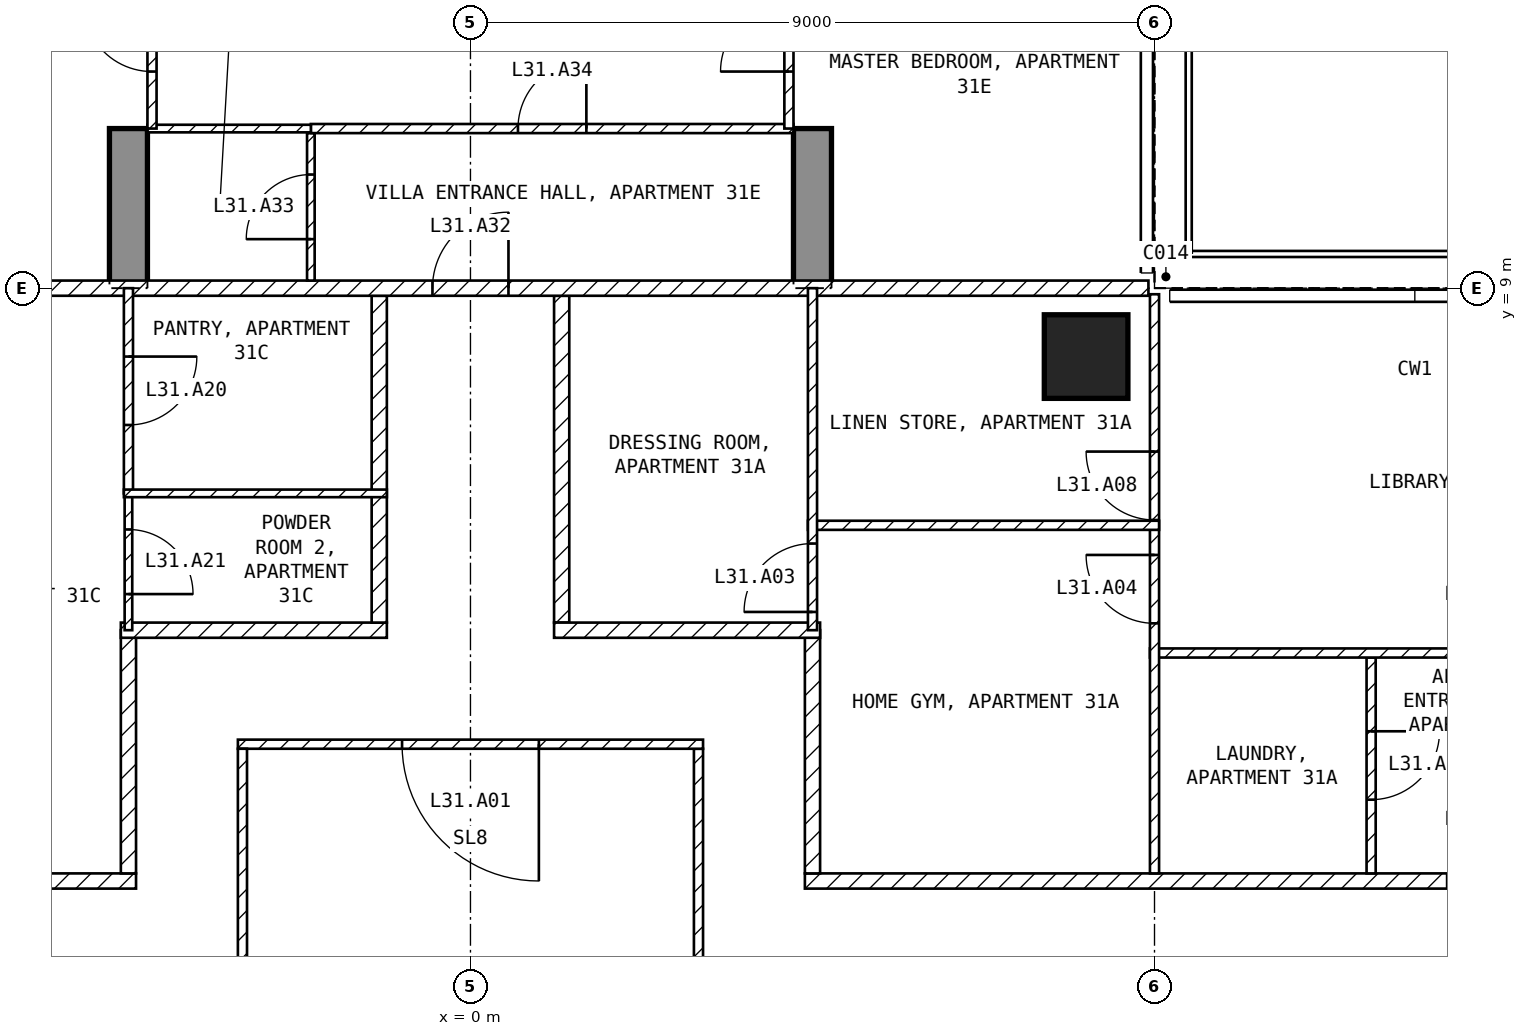
"""IFC4 building model, lengths in metres.
Left out: names, types, materials, properties, quantities, classifications, styles, units other than length and angle.
Written with IfcOpenShell. Run it as: python <this file> out.ifc"""

import sys

from ifc_helpers import new_model, si_unit, direction, frame, frame_2d, origin, origin_2d, place, context, subcontext, project, spatial, polyline, rectangle, outline, extrude, element, fill, save


model = new_model("IFC4")
c1 = context("Model", 3, precision=1e-05, world=origin(), true_north=direction((0.0, 1.0)))
c2 = subcontext(c1, "Body", "Model", "MODEL_VIEW")
j1 = project(units=[si_unit("LENGTHUNIT", "METRE"), si_unit("PLANEANGLEUNIT", "RADIAN")], contexts=[c1])
p1 = place(None, origin())
s1 = spatial("IfcSite", under=j1, at=p1, CompositionType="ELEMENT")
p2 = place(p1, origin())
s2 = spatial("IfcBuilding", under=s1, at=p2, CompositionType="ELEMENT")
p3 = place(p2, frame((0.0, 0.0, 130.4)))
s3 = spatial("IfcBuildingStorey", under=s2, at=p3, CompositionType="ELEMENT", Elevation=130.4)
p4 = place(p3, frame((8.1, 8.1, -0.25), z_axis=(0.0, 0.0, 1.0), x_axis=(1.0, 0.0, 0.0)))
e1 = element("IfcColumn", 1, at=p4, inside=s3, PredefinedType="COLUMN", context=c2, shape_type="SweptSolid", body=[
    extrude(rectangle(XDim=1.1, YDim=1.1, at=origin_2d()), origin(), (0.0, 0.0, 1.0), 3.5),
])
for number, where, z_axis, x_axis in (
    (2, (-4.75, 9.0, -0.25), (1.0, 0.0, 0.0), (0.0, 1.0, 0.0)),
    (3, (4.25, 9.0, -0.25), (1.0, 0.0, 0.0), (0.0, 1.0, 0.0)),
):
    element("IfcWall", number, at=place(p3, frame(where, z_axis=z_axis, x_axis=x_axis)), inside=s3, PredefinedType="SHEAR", context=c2, shape_type="SweptSolid", body=[
        extrude(outline(polyline([(0.0, 0.0), (2.1, 0.0), (2.1, 2.65), (4.5, 2.65), (4.5, 0.0), (9.9, 0.0), (9.9, 2.65), (12.3, 2.65), (12.3, 0.0), (16.55, 0.0), (16.55, 3.5), (0.0, 3.5), (0.0, 0.0)])), origin(), (0.0, 0.0, 1.0), 0.5),
    ])
p5 = place(p3, frame((3.0, -2.94, 0.0), z_axis=(0.0, 0.0, 1.0), x_axis=(0.0, 1.0, 0.0)))
e4 = element("IfcWall", 4, at=p5, inside=s3, PredefinedType="PARTITIONING", context=c2, shape_type="SweptSolid", body=[
    extrude(rectangle(XDim=5.88, YDim=0.12, at=frame_2d((2.94, 0.0))), origin(), (0.0, 0.0, 1.0), 3.25),
])
p6 = place(p3, frame((3.06, 3.0, 0.0), z_axis=(0.0, 0.0, 1.0), x_axis=(-1.0, 0.0, 0.0)))
e5 = element("IfcWall", 5, at=p6, inside=s3, PredefinedType="PARTITIONING", context=c2, shape_type="SweptSolid", body=[
    extrude(rectangle(XDim=6.12, YDim=0.12, at=frame_2d((3.06, 0.0))), origin(), (0.0, 0.0, 1.0), 3.25),
])
p7 = place(p6, frame((2.16, 0.0, 0.0)))
e6 = element("IfcOpeningElement", 6, at=p7, cuts=e5, PredefinedType="OPENING", context=c2, shape_type="SweptSolid", body=[
    extrude(rectangle(XDim=1.8, YDim=2.1, at=frame_2d((0.9, 1.05))), frame((0.0, 0.07, 0.0), z_axis=(0.0, -1.0, 0.0), x_axis=(1.0, 0.0, 0.0)), (0.0, 0.0, 1.0), 0.14),
])
p8 = place(p3, frame((-3.0, 2.94, 0.0), z_axis=(0.0, 0.0, 1.0), x_axis=(0.0, -1.0, 0.0)))
e7 = element("IfcWall", 7, at=p8, inside=s3, PredefinedType="PARTITIONING", context=c2, shape_type="SweptSolid", body=[
    extrude(rectangle(XDim=5.88, YDim=0.12, at=frame_2d((2.94, 0.0))), origin(), (0.0, 0.0, 1.0), 3.25),
])
p9 = place(p3, frame((4.4, 1.2, 0.0), z_axis=(0.0, 0.0, 1.0), x_axis=(1.0, 0.0, 0.0)))
e8 = element("IfcWall", 8, at=p9, inside=s3, PredefinedType="PARTITIONING", context=c2, shape_type="SweptSolid", body=[
    extrude(rectangle(XDim=17.2, YDim=0.2, at=frame_2d((8.6, 0.0))), origin(), (0.0, 0.0, 1.0), 3.25),
])
p10 = place(p9, frame((8.45, 0.0, 0.0)))
e9 = element("IfcOpeningElement", 9, at=p10, cuts=e8, PredefinedType="OPENING", context=c2, shape_type="SweptSolid", body=[
    extrude(rectangle(XDim=1.0, YDim=2.1, at=frame_2d((0.5, 1.05))), frame((0.0, 0.11, 0.0), z_axis=(0.0, -1.0, 0.0), x_axis=(1.0, 0.0, 0.0)), (0.0, 0.0, 1.0), 0.22),
])
p11 = place(p3, frame((4.5, 4.5, 0.0), z_axis=(0.0, 0.0, 1.0), x_axis=(0.0, -1.0, 0.0)))
e10 = element("IfcWall", 10, at=p11, inside=s3, PredefinedType="PARTITIONING", context=c2, shape_type="SweptSolid", body=[
    extrude(rectangle(XDim=3.2, YDim=0.2, at=frame_2d((1.6, 0.0))), origin(), (0.0, 0.0, 1.0), 3.25),
])
p12 = place(p3, frame((1.2, 8.9, 0.0), z_axis=(0.0, 0.0, 1.0), x_axis=(0.0, -1.0, 0.0)))
e11 = element("IfcWall", 11, at=p12, inside=s3, PredefinedType="PARTITIONING", context=c2, shape_type="SweptSolid", body=[
    extrude(rectangle(XDim=4.3, YDim=0.2, at=frame_2d((2.15, 0.0))), origin(), (0.0, 0.0, 1.0), 3.25),
])
p13 = place(p3, frame((1.1, 4.5, 0.0), z_axis=(0.0, 0.0, 1.0), x_axis=(1.0, 0.0, 0.0)))
e12 = element("IfcWall", 12, at=p13, inside=s3, PredefinedType="PARTITIONING", context=c2, shape_type="SweptSolid", body=[
    extrude(rectangle(XDim=3.5, YDim=0.2, at=frame_2d((1.75, 0.0))), origin(), (0.0, 0.0, 1.0), 3.25),
])
p14 = place(p3, frame((-21.6, 1.2, 0.0), z_axis=(0.0, 0.0, 1.0), x_axis=(1.0, 0.0, 0.0)))
e13 = element("IfcWall", 13, at=p14, inside=s3, PredefinedType="PARTITIONING", context=c2, shape_type="SweptSolid", body=[
    extrude(rectangle(XDim=17.2, YDim=0.2, at=frame_2d((8.6, 0.0))), origin(), (0.0, 0.0, 1.0), 3.25),
])
p15 = place(p14, frame((10.9, 0.0, 0.0)))
e14 = element("IfcOpeningElement", 14, at=p15, cuts=e13, PredefinedType="OPENING", context=c2, shape_type="SweptSolid", body=[
    extrude(rectangle(XDim=1.0, YDim=2.1, at=frame_2d((0.5, 1.05))), frame((0.0, 0.11, 0.0), z_axis=(0.0, -1.0, 0.0), x_axis=(1.0, 0.0, 0.0)), (0.0, 0.0, 1.0), 0.22),
])
p16 = place(p3, frame((-4.5, 1.3, 0.0), z_axis=(0.0, 0.0, 1.0), x_axis=(0.0, 1.0, 0.0)))
e15 = element("IfcWall", 15, at=p16, inside=s3, PredefinedType="PARTITIONING", context=c2, shape_type="SweptSolid", body=[
    extrude(rectangle(XDim=3.2, YDim=0.2, at=frame_2d((1.6, 0.0))), origin(), (0.0, 0.0, 1.0), 3.25),
])
p17 = place(p3, frame((-4.6, 4.5, 0.0), z_axis=(0.0, 0.0, 1.0), x_axis=(1.0, 0.0, 0.0)))
e16 = element("IfcWall", 16, at=p17, inside=s3, PredefinedType="PARTITIONING", context=c2, shape_type="SweptSolid", body=[
    extrude(rectangle(XDim=3.5, YDim=0.2, at=frame_2d((1.75, 0.0))), origin(), (0.0, 0.0, 1.0), 3.25),
])
p18 = place(p3, frame((-1.2, 4.6, 0.0), z_axis=(0.0, 0.0, 1.0), x_axis=(0.0, 1.0, 0.0)))
e17 = element("IfcWall", 17, at=p18, inside=s3, PredefinedType="PARTITIONING", context=c2, shape_type="SweptSolid", body=[
    extrude(rectangle(XDim=4.3, YDim=0.2, at=frame_2d((2.15, 0.0))), origin(), (0.0, 0.0, 1.0), 3.25),
])
p19 = place(p3, frame((-8.92, 9.0, 0.0), z_axis=(0.0, 0.0, 1.0), x_axis=(1.0, 0.0, 0.0)))
e18 = element("IfcWall", 18, at=p19, inside=s3, PredefinedType="PARTITIONING", context=c2, shape_type="SweptSolid", body=[
    extrude(rectangle(XDim=17.84, YDim=0.2, at=frame_2d((8.92, 0.0))), origin(), (0.0, 0.0, 1.0), 3.25),
])
p20 = place(p19, frame((8.42, 0.0, 0.0)))
e19 = element("IfcOpeningElement", 19, at=p20, cuts=e18, PredefinedType="OPENING", context=c2, shape_type="SweptSolid", body=[
    extrude(rectangle(XDim=1.0, YDim=2.1, at=frame_2d((0.5, 1.05))), frame((0.0, 0.11, 0.0), z_axis=(0.0, -1.0, 0.0), x_axis=(1.0, 0.0, 0.0)), (0.0, 0.0, 1.0), 0.22),
])
p21 = place(p3, frame((11.85, 4.14, 0.0), z_axis=(0.0, 0.0, 1.0), x_axis=(0.0, -1.0, 0.0)))
e20 = element("IfcWall", 20, at=p21, inside=s3, PredefinedType="PARTITIONING", context=c2, shape_type="SweptSolid", body=[
    extrude(rectangle(XDim=2.84, YDim=0.12, at=frame_2d((1.42, 0.0))), origin(), (0.0, 0.0, 1.0), 3.25),
])
p22 = place(p21, frame((0.97, 0.0, 0.0)))
e21 = element("IfcOpeningElement", 21, at=p22, cuts=e20, PredefinedType="OPENING", context=c2, shape_type="SweptSolid", body=[
    extrude(rectangle(XDim=0.9, YDim=2.1, at=frame_2d((0.45, 1.05))), frame((0.0, 0.07, 0.0), z_axis=(0.0, -1.0, 0.0), x_axis=(1.0, 0.0, 0.0)), (0.0, 0.0, 1.0), 0.14),
])
p23 = place(p3, frame((8.94, 4.2, 0.0), z_axis=(0.0, 0.0, 1.0), x_axis=(1.0, 0.0, 0.0)))
e22 = element("IfcWall", 22, at=p23, inside=s3, PredefinedType="PARTITIONING", context=c2, shape_type="SweptSolid", body=[
    extrude(rectangle(XDim=10.71, YDim=0.12, at=frame_2d((5.355, 0.0))), origin(), (0.0, 0.0, 1.0), 3.25),
])
p24 = place(p23, frame((3.96, 0.0, 0.0)))
e23 = element("IfcOpeningElement", 23, at=p24, cuts=e22, PredefinedType="OPENING", context=c2, shape_type="SweptSolid", body=[
    extrude(rectangle(XDim=0.9, YDim=2.1, at=frame_2d((0.45, 1.05))), frame((0.0, 0.07, 0.0), z_axis=(0.0, -1.0, 0.0), x_axis=(1.0, 0.0, 0.0)), (0.0, 0.0, 1.0), 0.14),
])
p25 = place(p3, frame((9.0, 1.3, 0.0), z_axis=(0.0, 0.0, 1.0), x_axis=(0.0, 1.0, 0.0)))
e24 = element("IfcWall", 24, at=p25, inside=s3, PredefinedType="PARTITIONING", context=c2, shape_type="SweptSolid", body=[
    extrude(rectangle(XDim=7.62, YDim=0.12, at=frame_2d((3.81, 0.0))), origin(), (0.0, 0.0, 1.0), 3.25),
])
p26 = place(p25, frame((3.29, 0.0, 0.0)))
e25 = element("IfcOpeningElement", 25, at=p26, cuts=e24, PredefinedType="OPENING", context=c2, shape_type="SweptSolid", body=[
    extrude(rectangle(XDim=0.9, YDim=2.1, at=frame_2d((0.45, 1.05))), frame((0.0, 0.07, 0.0), z_axis=(0.0, -1.0, 0.0), x_axis=(1.0, 0.0, 0.0)), (0.0, 0.0, 1.0), 0.14),
])
p27 = place(p25, frame((4.65, 0.0, 0.0)))
e26 = element("IfcOpeningElement", 26, at=p27, cuts=e24, PredefinedType="OPENING", context=c2, shape_type="SweptSolid", body=[
    extrude(rectangle(XDim=0.9, YDim=2.1, at=frame_2d((0.45, 1.05))), frame((0.0, 0.07, 0.0), z_axis=(0.0, -1.0, 0.0), x_axis=(1.0, 0.0, 0.0)), (0.0, 0.0, 1.0), 0.14),
])
p28 = place(p3, frame((4.44, 5.88, 0.0), z_axis=(0.0, 0.0, 1.0), x_axis=(1.0, 0.0, 0.0)))
e27 = element("IfcWall", 27, at=p28, inside=s3, PredefinedType="PARTITIONING", context=c2, shape_type="SweptSolid", body=[
    extrude(rectangle(XDim=4.62, YDim=0.12, at=frame_2d((2.31, 0.0))), origin(), (0.0, 0.0, 1.0), 3.25),
])
p29 = place(p3, frame((4.5, 4.5, 0.0), z_axis=(0.0, 0.0, 1.0), x_axis=(0.0, 1.0, 0.0)))
e28 = element("IfcWall", 28, at=p29, inside=s3, PredefinedType="PARTITIONING", context=c2, shape_type="SweptSolid", body=[
    extrude(rectangle(XDim=4.5, YDim=0.12, at=frame_2d((2.25, 0.0))), origin(), (0.0, 0.0, 1.0), 3.25),
])
p30 = place(p29, frame((0.24, 0.0, 0.0)))
e29 = element("IfcOpeningElement", 29, at=p30, cuts=e28, PredefinedType="OPENING", context=c2, shape_type="SweptSolid", body=[
    extrude(rectangle(XDim=0.9, YDim=2.1, at=frame_2d((0.45, 1.05))), frame((0.0, 0.07, 0.0), z_axis=(0.0, -1.0, 0.0), x_axis=(1.0, 0.0, 0.0)), (0.0, 0.0, 1.0), 0.14),
])
p31 = place(p3, frame((-4.5, 6.3, 0.0), z_axis=(0.0, 0.0, 1.0), x_axis=(0.0, -1.0, 0.0)))
e30 = element("IfcWall", 30, at=p31, inside=s3, PredefinedType="PARTITIONING", context=c2, shape_type="SweptSolid", body=[
    extrude(rectangle(XDim=1.8, YDim=0.1, at=frame_2d((0.9, 0.0))), origin(), (0.0, 0.0, 1.0), 3.25),
])
p32 = place(p31, frame((0.475, 0.0, 0.0)))
e31 = element("IfcOpeningElement", 31, at=p32, cuts=e30, PredefinedType="OPENING", context=c2, shape_type="SweptSolid", body=[
    extrude(rectangle(XDim=0.85, YDim=2.1, at=frame_2d((0.425, 1.05))), frame((0.0, 0.06, 0.0), z_axis=(0.0, -1.0, 0.0), x_axis=(1.0, 0.0, 0.0)), (0.0, 0.0, 1.0), 0.12),
])
p33 = place(p3, frame((-4.5, 9.0, 0.0), z_axis=(0.0, 0.0, 1.0), x_axis=(0.0, -1.0, 0.0)))
e32 = element("IfcWall", 32, at=p33, inside=s3, PredefinedType="PARTITIONING", context=c2, shape_type="SweptSolid", body=[
    extrude(rectangle(XDim=2.7, YDim=0.12, at=frame_2d((1.35, 0.0))), origin(), (0.0, 0.0, 1.0), 3.25),
])
p34 = place(p33, frame((0.9, 0.0, 0.0)))
e33 = element("IfcOpeningElement", 33, at=p34, cuts=e32, PredefinedType="OPENING", context=c2, shape_type="SweptSolid", body=[
    extrude(rectangle(XDim=0.9, YDim=2.1, at=frame_2d((0.45, 1.05))), frame((0.0, 0.07, 0.0), z_axis=(0.0, -1.0, 0.0), x_axis=(1.0, 0.0, 0.0)), (0.0, 0.0, 1.0), 0.14),
])
p35 = place(p3, frame((-4.56, 6.3, 0.0), z_axis=(0.0, 0.0, 1.0), x_axis=(1.0, 0.0, 0.0)))
e34 = element("IfcWall", 34, at=p35, inside=s3, PredefinedType="PARTITIONING", context=c2, shape_type="SweptSolid", body=[
    extrude(rectangle(XDim=3.46, YDim=0.1, at=frame_2d((1.73, 0.0))), origin(), (0.0, 0.0, 1.0), 3.25),
])
p36 = place(p3, frame((-2.1, 9.1, 0.0), z_axis=(0.0, 0.0, 1.0), x_axis=(0.0, 1.0, 0.0)))
e35 = element("IfcWall", 35, at=p36, inside=s3, PredefinedType="PARTITIONING", context=c2, shape_type="SweptSolid", body=[
    extrude(rectangle(XDim=1.94, YDim=0.1, at=frame_2d((0.97, 0.0))), origin(), (0.0, 0.0, 1.0), 3.25),
])
p37 = place(p36, frame((0.545, 0.0, 0.0)))
e36 = element("IfcOpeningElement", 36, at=p37, cuts=e35, PredefinedType="OPENING", context=c2, shape_type="SweptSolid", body=[
    extrude(rectangle(XDim=0.85, YDim=2.1, at=frame_2d((0.425, 1.05))), frame((0.0, 0.06, 0.0), z_axis=(0.0, -1.0, 0.0), x_axis=(1.0, 0.0, 0.0)), (0.0, 0.0, 1.0), 0.12),
])
p38 = place(p3, frame((-2.1, 11.1, 0.0), z_axis=(0.0, 0.0, 1.0), x_axis=(1.0, 0.0, 0.0)))
e37 = element("IfcWall", 37, at=p38, inside=s3, PredefinedType="PARTITIONING", context=c2, shape_type="SweptSolid", body=[
    extrude(rectangle(XDim=6.35, YDim=0.12, at=frame_2d((3.175, 0.0))), origin(), (0.0, 0.0, 1.0), 3.25),
])
p39 = place(p38, frame((2.725, 0.0, 0.0)))
e38 = element("IfcOpeningElement", 38, at=p39, cuts=e37, PredefinedType="OPENING", context=c2, shape_type="SweptSolid", body=[
    extrude(rectangle(XDim=0.9, YDim=2.1, at=frame_2d((0.45, 1.05))), frame((0.0, 0.07, 0.0), z_axis=(0.0, -1.0, 0.0), x_axis=(1.0, 0.0, 0.0)), (0.0, 0.0, 1.0), 0.14),
])
p40 = place(p3, frame((-4.25, 11.1, 0.0), z_axis=(0.0, 0.0, 1.0), x_axis=(1.0, 0.0, 0.0)))
e39 = element("IfcWall", 39, at=p40, inside=s3, PredefinedType="PARTITIONING", context=c2, shape_type="SweptSolid", body=[
    extrude(rectangle(XDim=2.15, YDim=0.1, at=frame_2d((1.075, 0.0))), origin(), (0.0, 0.0, 1.0), 3.25),
])
p41 = place(p3, frame((4.19, 11.1, 0.0), z_axis=(0.0, 0.0, 1.0), x_axis=(0.0, 1.0, 0.0)))
e40 = element("IfcWall", 40, at=p41, inside=s3, PredefinedType="PARTITIONING", context=c2, shape_type="SweptSolid", body=[
    extrude(rectangle(XDim=2.4, YDim=0.12, at=frame_2d((1.2, 0.0))), origin(), (0.0, 0.0, 1.0), 2.4),
])
p42 = place(p41, frame((0.75, 0.0, 0.0)))
e41 = element("IfcOpeningElement", 41, at=p42, cuts=e40, PredefinedType="OPENING", context=c2, shape_type="SweptSolid", body=[
    extrude(rectangle(XDim=0.9, YDim=2.1, at=frame_2d((0.45, 1.05))), frame((0.0, 0.07, 0.0), z_axis=(0.0, -1.0, 0.0), x_axis=(1.0, 0.0, 0.0)), (0.0, 0.0, 1.0), 0.14),
])
p43 = place(p3, frame((-4.19, 11.1, 0.0), z_axis=(0.0, 0.0, 1.0), x_axis=(0.0, 1.0, 0.0)))
e42 = element("IfcWall", 42, at=p43, inside=s3, PredefinedType="PARTITIONING", context=c2, shape_type="SweptSolid", body=[
    extrude(rectangle(XDim=2.4, YDim=0.12, at=frame_2d((1.2, 0.0))), origin(), (0.0, 0.0, 1.0), 2.4),
])
p44 = place(p43, frame((0.75, 0.0, 0.0)))
e43 = element("IfcOpeningElement", 43, at=p44, cuts=e42, PredefinedType="OPENING", context=c2, shape_type="SweptSolid", body=[
    extrude(rectangle(XDim=0.9, YDim=2.1, at=frame_2d((0.45, 1.05))), frame((0.0, 0.07, 0.0), z_axis=(0.0, -1.0, 0.0), x_axis=(1.0, 0.0, 0.0)), (0.0, 0.0, 1.0), 0.14),
])
p45 = place(p7, origin())
e44 = element("IfcDoor", 44, at=p45, inside=s3, OperationType="SINGLE_SWING_LEFT", PredefinedType="DOOR", context=c2, shape_type="SweptSolid", body=[
    extrude(rectangle(XDim=1.8, YDim=2.1, at=frame_2d((0.9, 1.05))), frame((0.0, 0.025, 0.0), z_axis=(0.0, -1.0, 0.0), x_axis=(1.0, 0.0, 0.0)), (0.0, 0.0, 1.0), 0.05),
])
fill(e6, e44)
p46 = place(p30, origin())
e45 = element("IfcDoor", 45, at=p46, inside=s3, OperationType="SINGLE_SWING_LEFT", PredefinedType="DOOR", context=c2, shape_type="SweptSolid", body=[
    extrude(rectangle(XDim=0.9, YDim=2.1, at=frame_2d((0.45, 1.05))), frame((0.0, 0.025, 0.0), z_axis=(0.0, -1.0, 0.0), x_axis=(1.0, 0.0, 0.0)), (0.0, 0.0, 1.0), 0.05),
])
fill(e29, e45)
p47 = place(p26, origin())
e46 = element("IfcDoor", 46, at=p47, inside=s3, OperationType="SINGLE_SWING_RIGHT", PredefinedType="DOOR", context=c2, shape_type="SweptSolid", body=[
    extrude(rectangle(XDim=0.9, YDim=2.1, at=frame_2d((0.45, 1.05))), frame((0.0, 0.025, 0.0), z_axis=(0.0, -1.0, 0.0), x_axis=(1.0, 0.0, 0.0)), (0.0, 0.0, 1.0), 0.05),
])
fill(e25, e46)
p48 = place(p22, origin())
e47 = element("IfcDoor", 47, at=p48, inside=s3, OperationType="SINGLE_SWING_LEFT", PredefinedType="DOOR", context=c2, shape_type="SweptSolid", body=[
    extrude(rectangle(XDim=0.9, YDim=2.1, at=frame_2d((0.45, 1.05))), frame((0.0, 0.025, 0.0), z_axis=(0.0, -1.0, 0.0), x_axis=(1.0, 0.0, 0.0)), (0.0, 0.0, 1.0), 0.05),
])
fill(e21, e47)
p49 = place(p27, origin())
e48 = element("IfcDoor", 48, at=p49, inside=s3, OperationType="SINGLE_SWING_RIGHT", PredefinedType="DOOR", context=c2, shape_type="SweptSolid", body=[
    extrude(rectangle(XDim=0.9, YDim=2.1, at=frame_2d((0.45, 1.05))), frame((0.0, 0.025, 0.0), z_axis=(0.0, -1.0, 0.0), x_axis=(1.0, 0.0, 0.0)), (0.0, 0.0, 1.0), 0.05),
])
fill(e26, e48)
p50 = place(p34, origin())
e49 = element("IfcDoor", 49, at=p50, inside=s3, OperationType="SINGLE_SWING_LEFT", PredefinedType="DOOR", context=c2, shape_type="SweptSolid", body=[
    extrude(rectangle(XDim=0.9, YDim=2.1, at=frame_2d((0.45, 1.05))), frame((0.0, 0.025, 0.0), z_axis=(0.0, -1.0, 0.0), x_axis=(1.0, 0.0, 0.0)), (0.0, 0.0, 1.0), 0.05),
])
fill(e33, e49)
p51 = place(p32, origin())
e50 = element("IfcDoor", 50, at=p51, inside=s3, OperationType="SINGLE_SWING_RIGHT", PredefinedType="DOOR", context=c2, shape_type="SweptSolid", body=[
    extrude(rectangle(XDim=0.85, YDim=2.1, at=frame_2d((0.425, 1.05))), frame((0.0, 0.025, 0.0), z_axis=(0.0, -1.0, 0.0), x_axis=(1.0, 0.0, 0.0)), (0.0, 0.0, 1.0), 0.05),
])
fill(e31, e50)
p52 = place(p20, origin())
e51 = element("IfcDoor", 51, at=p52, inside=s3, OperationType="SINGLE_SWING_RIGHT", PredefinedType="DOOR", context=c2, shape_type="SweptSolid", body=[
    extrude(rectangle(XDim=1.0, YDim=2.1, at=frame_2d((0.5, 1.05))), frame((0.0, 0.025, 0.0), z_axis=(0.0, -1.0, 0.0), x_axis=(1.0, 0.0, 0.0)), (0.0, 0.0, 1.0), 0.05),
])
fill(e19, e51)
p53 = place(p37, origin())
e52 = element("IfcDoor", 52, at=p53, inside=s3, OperationType="SINGLE_SWING_LEFT", PredefinedType="DOOR", context=c2, shape_type="SweptSolid", body=[
    extrude(rectangle(XDim=0.85, YDim=2.1, at=frame_2d((0.425, 1.05))), frame((0.0, 0.025, 0.0), z_axis=(0.0, -1.0, 0.0), x_axis=(1.0, 0.0, 0.0)), (0.0, 0.0, 1.0), 0.05),
])
fill(e36, e52)
p54 = place(p39, origin())
e53 = element("IfcDoor", 53, at=p54, inside=s3, OperationType="SINGLE_SWING_RIGHT", PredefinedType="DOOR", context=c2, shape_type="SweptSolid", body=[
    extrude(rectangle(XDim=0.9, YDim=2.1, at=frame_2d((0.45, 1.05))), frame((0.0, 0.025, 0.0), z_axis=(0.0, -1.0, 0.0), x_axis=(1.0, 0.0, 0.0)), (0.0, 0.0, 1.0), 0.05),
])
fill(e38, e53)
p55 = place(p10, origin())
e54 = element("IfcDoor", 54, at=p55, inside=s3, OperationType="SINGLE_SWING_RIGHT", PredefinedType="DOOR", context=c2, shape_type="SweptSolid", body=[
    extrude(rectangle(XDim=1.0, YDim=2.1, at=frame_2d((0.5, 1.05))), frame((0.0, 0.025, 0.0), z_axis=(0.0, -1.0, 0.0), x_axis=(1.0, 0.0, 0.0)), (0.0, 0.0, 1.0), 0.05),
])
fill(e9, e54)
p56 = place(p42, origin())
e55 = element("IfcDoor", 55, at=p56, inside=s3, OperationType="SINGLE_SWING_LEFT", PredefinedType="DOOR", context=c2, shape_type="SweptSolid", body=[
    extrude(rectangle(XDim=0.9, YDim=2.1, at=frame_2d((0.45, 1.05))), frame((0.0, 0.025, 0.0), z_axis=(0.0, -1.0, 0.0), x_axis=(1.0, 0.0, 0.0)), (0.0, 0.0, 1.0), 0.05),
])
fill(e41, e55)
p57 = place(p44, origin())
e56 = element("IfcDoor", 56, at=p57, inside=s3, OperationType="SINGLE_SWING_RIGHT", PredefinedType="DOOR", context=c2, shape_type="SweptSolid", body=[
    extrude(rectangle(XDim=0.9, YDim=2.1, at=frame_2d((0.45, 1.05))), frame((0.0, 0.025, 0.0), z_axis=(0.0, -1.0, 0.0), x_axis=(1.0, 0.0, 0.0)), (0.0, 0.0, 1.0), 0.05),
])
fill(e43, e56)
save(model, sys.argv[1])
